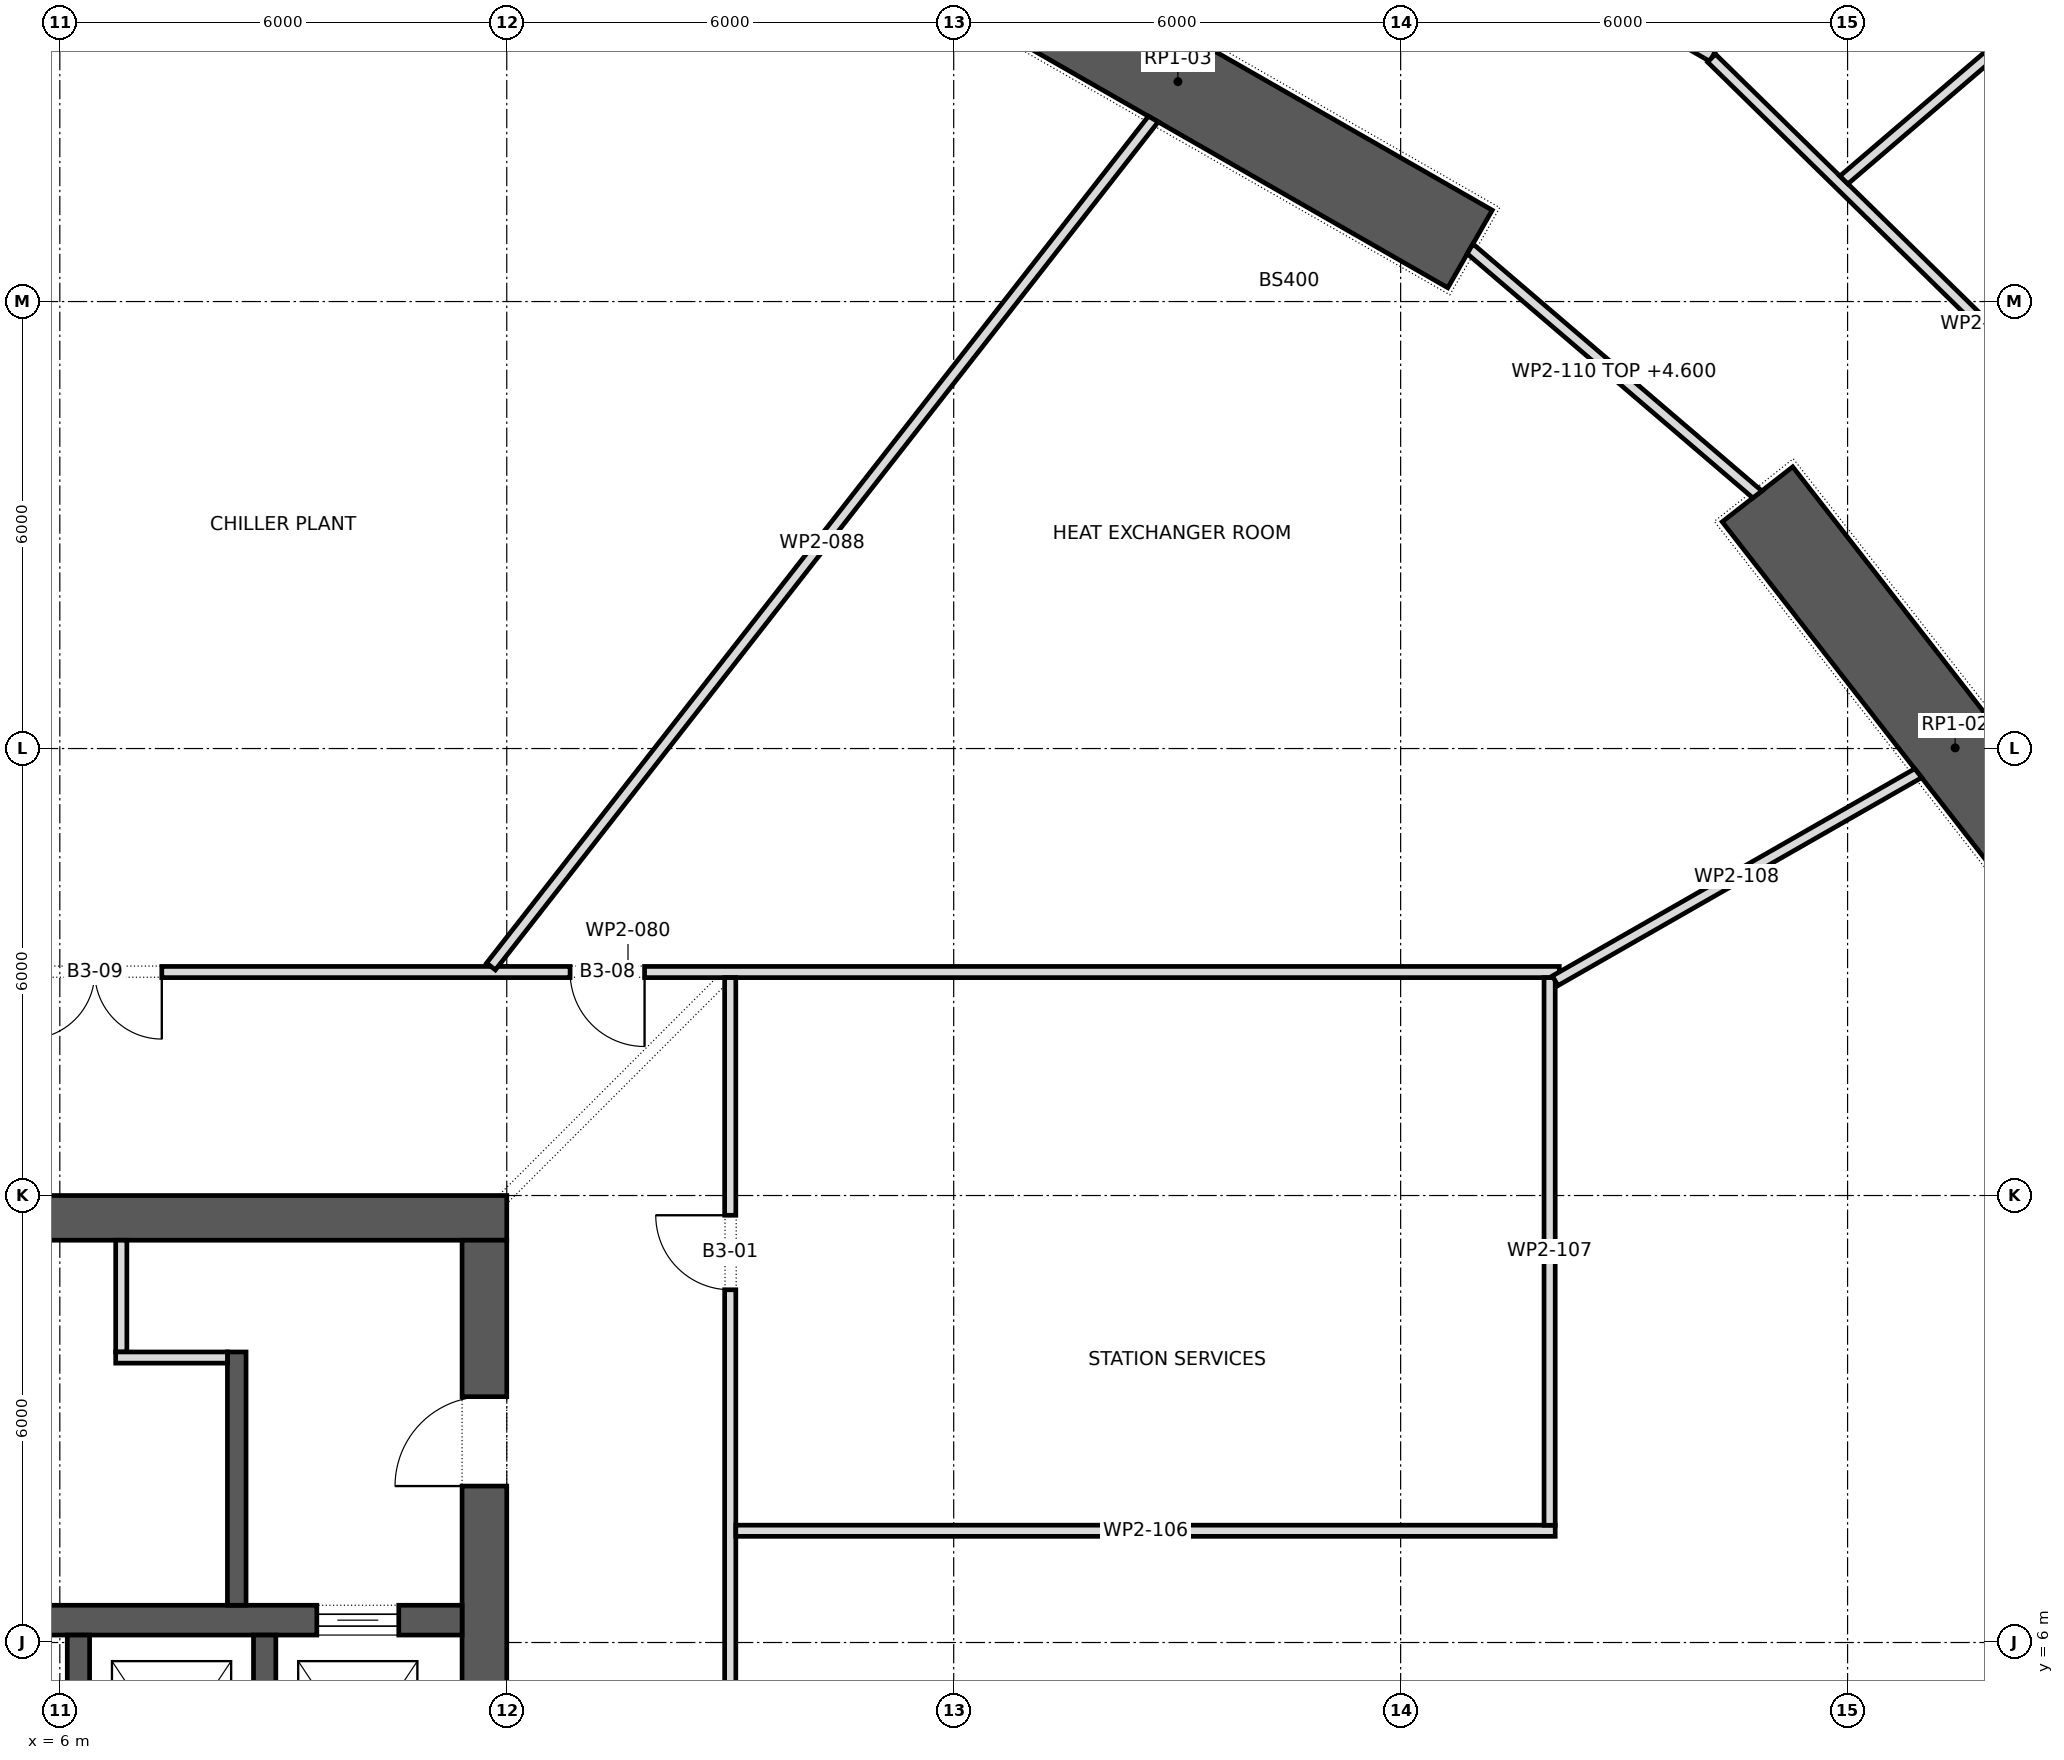
"""IFC4 building model, lengths in metres.
Left out: names, types, materials, properties, quantities, classifications, styles, units other than length and angle.
Written with IfcOpenShell. Run it as: python <this file> out.ifc"""

import sys

from ifc_helpers import new_model, si_unit, direction, frame, frame_2d, origin, place, context, subcontext, project, spatial, polyline, rectangle, outline, extrude, element, fill, save


model = new_model("IFC4")
c1 = context("Model", 3, precision=1e-05, world=origin(), true_north=direction((0.0, 1.0)))
c2 = subcontext(c1, "Body", "Model", "MODEL_VIEW")
j1 = project(units=[si_unit("LENGTHUNIT", "METRE"), si_unit("PLANEANGLEUNIT", "RADIAN")], contexts=[c1])
p1 = place(None, origin())
s1 = spatial("IfcSite", under=j1, at=p1, CompositionType="ELEMENT")
p2 = place(p1, origin())
s2 = spatial("IfcBuilding", under=s1, at=p2, CompositionType="ELEMENT")
p3 = place(p2, frame((0.0, 0.0, -15.0)))
s3 = spatial("IfcBuildingStorey", under=s2, at=p3, CompositionType="ELEMENT", Elevation=-15.0)
p4 = place(p3, frame((34.097, 14.605, -0.4), z_axis=(0.0, 0.0, 1.0), x_axis=(-0.614825322247, 0.788663314174, 0.0)))
e1 = element("IfcWall", 1, at=p4, inside=s3, PredefinedType="SHEAR", context=c2, shape_type="SweptSolid", body=[
    extrude(rectangle(XDim=8.632, YDim=1.2, at=frame_2d((4.316, 0.0))), origin(), (0.0, 0.0, 1.0), 5.9),
])
p5 = place(p3, frame((24.931, 24.706, -0.4), z_axis=(0.0, 0.0, 1.0), x_axis=(-0.867760656864, 0.496982336103, 0.0)))
e2 = element("IfcWall", 2, at=p5, inside=s3, PredefinedType="SHEAR", context=c2, shape_type="SweptSolid", body=[
    extrude(rectangle(XDim=9.038, YDim=1.2, at=frame_2d((4.519, 0.0))), origin(), (0.0, 0.0, 1.0), 5.9),
])
p6 = place(p3, frame((-12.0, 11.7, 0.0), z_axis=(0.0, 0.0, 1.0), x_axis=(1.0, 0.0, 0.0)))
e3 = element("IfcWall", 3, at=p6, inside=s3, PredefinedType="SHEAR", context=c2, shape_type="SweptSolid", body=[
    extrude(rectangle(XDim=24.0, YDim=0.6, at=frame_2d((12.0, 0.0))), origin(), (0.0, 0.0, 1.0), 5.5),
])
p7 = place(p6, frame((11.6, 0.0, 0.0)))
e4 = element("IfcOpeningElement", 4, at=p7, cuts=e3, PredefinedType="OPENING", context=c2, shape_type="SweptSolid", body=[
    extrude(rectangle(XDim=0.8, YDim=2.1, at=frame_2d((0.4, 1.05))), frame((0.0, 0.312, 0.0), z_axis=(0.0, -1.0, 0.0), x_axis=(1.0, 0.0, 0.0)), (0.0, 0.0, 1.0), 0.624),
])
p8 = place(p3, frame((11.7, -11.4, 0.0), z_axis=(0.0, 0.0, 1.0), x_axis=(0.0, 1.0, 0.0)))
e5 = element("IfcWall", 5, at=p8, inside=s3, PredefinedType="SHEAR", context=c2, shape_type="SweptSolid", body=[
    extrude(rectangle(XDim=22.8, YDim=0.6, at=frame_2d((11.4, 0.0))), origin(), (0.0, 0.0, 1.0), 5.5),
])
p9 = place(p8, frame((10.2, 0.0, 0.0)))
e6 = element("IfcOpeningElement", 6, at=p9, cuts=e5, PredefinedType="OPENING", context=c2, shape_type="SweptSolid", body=[
    extrude(rectangle(XDim=2.4, YDim=2.1, at=frame_2d((1.2, 1.05))), frame((0.0, 0.312, 0.0), z_axis=(0.0, -1.0, 0.0), x_axis=(1.0, 0.0, 0.0)), (0.0, 0.0, 1.0), 0.624),
])
p10 = place(p8, frame((19.5, 0.0, 0.0)))
e7 = element("IfcOpeningElement", 7, at=p10, cuts=e5, PredefinedType="OPENING", context=c2, shape_type="SweptSolid", body=[
    extrude(rectangle(XDim=1.2, YDim=2.1, at=frame_2d((0.6, 1.05))), frame((0.0, 0.312, 0.0), z_axis=(0.0, -1.0, 0.0), x_axis=(1.0, 0.0, 0.0)), (0.0, 0.0, 1.0), 0.624),
])
p11 = place(p8, frame((2.1, 0.0, 0.0)))
e8 = element("IfcOpeningElement", 8, at=p11, cuts=e5, PredefinedType="OPENING", context=c2, shape_type="SweptSolid", body=[
    extrude(rectangle(XDim=1.2, YDim=2.1, at=frame_2d((0.6, 1.05))), frame((0.0, 0.312, 0.0), z_axis=(0.0, -1.0, 0.0), x_axis=(1.0, 0.0, 0.0)), (0.0, 0.0, 1.0), 0.624),
])
p12 = place(p3, frame((-11.4, 6.3, 0.0), z_axis=(0.0, 0.0, 1.0), x_axis=(1.0, 0.0, 0.0)))
e9 = element("IfcWall", 9, at=p12, inside=s3, PredefinedType="SHEAR", context=c2, shape_type="SweptSolid", body=[
    extrude(rectangle(XDim=22.8, YDim=0.4, at=frame_2d((11.4, 0.0))), origin(), (0.0, 0.0, 1.0), 5.5),
])
p13 = place(p12, frame((20.85, 0.0, 0.0)))
e10 = element("IfcOpeningElement", 10, at=p13, cuts=e9, PredefinedType="OPENING", context=c2, shape_type="SweptSolid", body=[
    extrude(rectangle(XDim=1.1, YDim=2.1, at=frame_2d((0.55, 1.05))), frame((0.0, 0.212, 0.0), z_axis=(0.0, -1.0, 0.0), x_axis=(1.0, 0.0, 0.0)), (0.0, 0.0, 1.0), 0.424),
])
for number, where, z_axis, x_axis in (
    (11, (6.25, 3.2, 0.0), (0.0, 0.0, 1.0), (0.0, 1.0, 0.0)),
    (12, (8.75, 3.2, 0.0), (0.0, 0.0, 1.0), (0.0, 1.0, 0.0)),
):
    element("IfcWall", number, at=place(p3, frame(where, z_axis=z_axis, x_axis=x_axis)), inside=s3, PredefinedType="SHEAR", context=c2, shape_type="SweptSolid", body=[
        extrude(rectangle(XDim=2.9, YDim=0.3, at=frame_2d((1.45, 0.0))), origin(), (0.0, 0.0, 1.0), 5.5),
    ])
p14 = place(p3, frame((8.375, 6.5, 0.0), z_axis=(0.0, 0.0, 1.0), x_axis=(0.0, 1.0, 0.0)))
e13 = element("IfcWall", 13, at=p14, inside=s3, PredefinedType="SHEAR", context=c2, shape_type="SweptSolid", body=[
    extrude(rectangle(XDim=3.4, YDim=0.25, at=frame_2d((1.7, 0.0))), origin(), (0.0, 0.0, 1.0), 5.15),
])
for number, where, z_axis, x_axis in (
    (14, (6.825, 9.9, 0.0), (0.0, 0.0, 1.0), (0.0, 1.0, 0.0)),
    (15, (6.75, 9.825, 0.0), (0.0, 0.0, 1.0), (1.0, 0.0, 0.0)),
):
    element("IfcWall", number, at=place(p3, frame(where, z_axis=z_axis, x_axis=x_axis)), inside=s3, PredefinedType="PARTITIONING", context=c2, shape_type="SweptSolid", body=[
        extrude(rectangle(XDim=1.5, YDim=0.15, at=frame_2d((0.75, 0.0))), origin(), (0.0, 0.0, 1.0), 5.15),
    ])
p15 = place(p3, frame((1.125, 15.0, 0.0), z_axis=(0.0, 0.0, 1.0), x_axis=(1.0, 0.0, 0.0)))
e16 = element("IfcWall", 16, at=p15, inside=s3, PredefinedType="PARTITIONING", context=c2, shape_type="SweptSolid", body=[
    extrude(rectangle(XDim=25.005, YDim=0.15, at=frame_2d((12.502, 0.0))), origin(), (0.0, 0.0, 1.0), 5.15),
])
p16 = place(p15, frame((11.725, 0.0, 0.0)))
e17 = element("IfcOpeningElement", 17, at=p16, cuts=e16, PredefinedType="OPENING", context=c2, shape_type="SweptSolid", body=[
    extrude(rectangle(XDim=1.0, YDim=2.1, at=frame_2d((0.5, 1.05))), frame((0.0, 0.087, 0.0), z_axis=(0.0, -1.0, 0.0), x_axis=(1.0, 0.0, 0.0)), (0.0, 0.0, 1.0), 0.174),
])
p17 = place(p15, frame((4.444, 0.0, 0.0)))
e18 = element("IfcOpeningElement", 18, at=p17, cuts=e16, PredefinedType="OPENING", context=c2, shape_type="SweptSolid", body=[
    extrude(rectangle(XDim=1.8, YDim=2.1, at=frame_2d((0.9, 1.05))), frame((0.0, 0.087, 0.0), z_axis=(0.0, -1.0, 0.0), x_axis=(1.0, 0.0, 0.0)), (0.0, 0.0, 1.0), 0.174),
])
p18 = place(p3, frame((11.788, 15.074, 0.0), z_axis=(0.0, 0.0, 1.0), x_axis=(0.615848120598, 0.787864894735, 0.0)))
e19 = element("IfcWall", 19, at=p18, inside=s3, PredefinedType="PARTITIONING", context=c2, shape_type="SweptSolid", body=[
    extrude(outline(polyline([(0.0, -0.075), (14.449, -0.075), (14.428, 0.075), (0.0, 0.075), (0.0, -0.075)])), origin(), (0.0, 0.0, 1.0), 5.15),
])
p19 = place(p3, frame((15.0, -14.925, 0.0), z_axis=(0.0, 0.0, 1.0), x_axis=(0.0, 1.0, 0.0)))
e20 = element("IfcWall", 20, at=p19, inside=s3, PredefinedType="PARTITIONING", context=c2, shape_type="SweptSolid", body=[
    extrude(rectangle(XDim=29.85, YDim=0.15, at=frame_2d((14.925, 0.0))), origin(), (0.0, 0.0, 1.0), 5.15),
])
p20 = place(p19, frame((25.66, 0.0, 0.0)))
e21 = element("IfcOpeningElement", 21, at=p20, cuts=e20, PredefinedType="OPENING", context=c2, shape_type="SweptSolid", body=[
    extrude(rectangle(XDim=1.0, YDim=2.1, at=frame_2d((0.5, 1.05))), frame((0.0, 0.087, 0.0), z_axis=(0.0, -1.0, 0.0), x_axis=(1.0, 0.0, 0.0)), (0.0, 0.0, 1.0), 0.174),
])
p21 = place(p19, frame((3.19, 0.0, 0.0)))
e22 = element("IfcOpeningElement", 22, at=p21, cuts=e20, PredefinedType="OPENING", context=c2, shape_type="SweptSolid", body=[
    extrude(rectangle(XDim=1.0, YDim=2.1, at=frame_2d((0.5, 1.05))), frame((0.0, 0.087, 0.0), z_axis=(0.0, -1.0, 0.0), x_axis=(1.0, 0.0, 0.0)), (0.0, 0.0, 1.0), 0.174),
])
p22 = place(p19, frame((13.725, 0.0, 0.0)))
e23 = element("IfcOpeningElement", 23, at=p22, cuts=e20, PredefinedType="OPENING", context=c2, shape_type="SweptSolid", body=[
    extrude(rectangle(XDim=2.4, YDim=2.1, at=frame_2d((1.2, 1.05))), frame((0.0, 0.087, 0.0), z_axis=(0.0, -1.0, 0.0), x_axis=(1.0, 0.0, 0.0)), (0.0, 0.0, 1.0), 0.174),
])
p23 = place(p3, frame((18.948, 32.58, 0.0), z_axis=(0.0, 0.0, 1.0), x_axis=(0.867835024459, -0.496852463336, 0.0)))
e24 = element("IfcWall", 24, at=p23, inside=s3, PredefinedType="PARTITIONING", context=c2, shape_type="SweptSolid", body=[
    extrude(rectangle(XDim=10.647, YDim=0.15, at=frame_2d((5.323, 0.0))), origin(), (0.0, 0.0, 1.0), 5.15),
])
p24 = place(p23, frame((4.323, 0.0, 0.0)))
e25 = element("IfcOpeningElement", 25, at=p24, cuts=e24, PredefinedType="OPENING", context=c2, shape_type="SweptSolid", body=[
    extrude(rectangle(XDim=1.8, YDim=2.1, at=frame_2d((0.9, 1.05))), frame((0.0, 0.087, 0.0), z_axis=(0.0, -1.0, 0.0), x_axis=(1.0, 0.0, 0.0)), (0.0, 0.0, 1.0), 0.174),
])
p25 = place(p3, frame((26.075, 7.5, 0.0), z_axis=(0.0, 0.0, 1.0), x_axis=(-1.0, 0.0, 0.0)))
e26 = element("IfcWall", 26, at=p25, inside=s3, PredefinedType="PARTITIONING", context=c2, shape_type="SweptSolid", body=[
    extrude(rectangle(XDim=11.0, YDim=0.15, at=frame_2d((5.5, 0.0))), origin(), (0.0, 0.0, 1.0), 5.15),
])
p26 = place(p3, frame((26.0, 7.574, 0.0), z_axis=(0.0, 0.0, 1.0), x_axis=(0.0, 1.0, 0.0)))
e27 = element("IfcWall", 27, at=p26, inside=s3, PredefinedType="PARTITIONING", context=c2, shape_type="SweptSolid", body=[
    extrude(rectangle(XDim=7.351, YDim=0.15, at=frame_2d((3.676, 0.0))), origin(), (0.0, 0.0, 1.0), 5.15),
])
p27 = place(p3, frame((26.074, 14.882, 0.0), z_axis=(0.0, 0.0, 1.0), x_axis=(0.868133416031, 0.496330909746, 0.0)))
e28 = element("IfcWall", 28, at=p27, inside=s3, PredefinedType="PARTITIONING", context=c2, shape_type="SweptSolid", body=[
    extrude(outline(polyline([(0.0, -0.075), (5.626, -0.075), (5.604, 0.075), (0.0, 0.075), (0.0, -0.075)])), origin(), (0.0, 0.0, 1.0), 5.15),
])
p28 = place(p3, frame((28.174, 27.268, 0.0), z_axis=(0.0, 0.0, 1.0), x_axis=(0.714427427428, -0.699709547554, 0.0)))
e29 = element("IfcWall", 29, at=p28, inside=s3, PredefinedType="PARTITIONING", context=c2, shape_type="SweptSolid", body=[
    extrude(rectangle(XDim=10.202, YDim=0.15, at=frame_2d((5.101, 0.0))), origin(), (0.0, 0.0, 1.0), 5.15),
])
p29 = place(p28, frame((5.74, 0.0, 0.0)))
e30 = element("IfcOpeningElement", 30, at=p29, cuts=e29, PredefinedType="OPENING", context=c2, shape_type="SweptSolid", body=[
    extrude(rectangle(XDim=1.0, YDim=2.1, at=frame_2d((0.5, 1.05))), frame((0.0, 0.087, 0.0), z_axis=(0.0, -1.0, 0.0), x_axis=(1.0, 0.0, 0.0)), (0.0, 0.0, 1.0), 0.174),
])
p30 = place(p3, frame((28.789, 21.411, 0.0), z_axis=(0.0, 0.0, 1.0), x_axis=(-0.760084552743, 0.649824185978, 0.0)))
e31 = element("IfcWall", 31, at=p30, inside=s3, PredefinedType="PARTITIONING", context=c2, shape_type="SweptSolid", body=[
    extrude(outline(polyline([(-0.015, -0.075), (5.089, -0.075), (5.061, 0.075), (0.015, 0.075), (-0.015, -0.075)])), origin(), (0.0, 0.0, 1.0), 4.6),
])
p31 = place(p3, frame((29.95, 25.632, 0.0), z_axis=(0.0, 0.0, 1.0), x_axis=(0.759739094859, 0.650228042876, 0.0)))
e32 = element("IfcWall", 32, at=p31, inside=s3, PredefinedType="PARTITIONING", context=c2, shape_type="SweptSolid", body=[
    extrude(outline(polyline([(0.007, -0.075), (9.901, -0.075), (9.878, 0.075), (-0.007, 0.075), (0.007, -0.075)])), origin(), (0.0, 0.0, 1.0), 5.15),
])
p32 = place(p13, origin())
e33 = element("IfcDoor", 33, at=p32, inside=s3, OperationType="SLIDING_TO_LEFT", PredefinedType="DOOR", context=c2, shape_type="SweptSolid", body=[
    extrude(rectangle(XDim=1.1, YDim=2.1, at=frame_2d((0.55, 1.05))), frame((0.0, 0.025, 0.0), z_axis=(0.0, -1.0, 0.0), x_axis=(1.0, 0.0, 0.0)), (0.0, 0.0, 1.0), 0.05),
])
fill(e10, e33)
p33 = place(p10, origin())
e34 = element("IfcDoor", 34, at=p33, inside=s3, OperationType="SINGLE_SWING_RIGHT", PredefinedType="DOOR", context=c2, shape_type="SweptSolid", body=[
    extrude(rectangle(XDim=1.2, YDim=2.1, at=frame_2d((0.6, 1.05))), frame((0.0, 0.025, 0.0), z_axis=(0.0, -1.0, 0.0), x_axis=(1.0, 0.0, 0.0)), (0.0, 0.0, 1.0), 0.05),
])
fill(e7, e34)
p34 = place(p20, origin())
e35 = element("IfcDoor", 35, at=p34, inside=s3, OperationType="SINGLE_SWING_LEFT", PredefinedType="DOOR", context=c2, shape_type="SweptSolid", body=[
    extrude(rectangle(XDim=1.0, YDim=2.1, at=frame_2d((0.5, 1.05))), frame((0.0, 0.025, 0.0), z_axis=(0.0, -1.0, 0.0), x_axis=(1.0, 0.0, 0.0)), (0.0, 0.0, 1.0), 0.05),
])
fill(e21, e35)
p35 = place(p16, frame((1.0, 0.0, 0.0), z_axis=(0.0, 0.0, 1.0), x_axis=(-1.0, 0.0, 0.0)))
e36 = element("IfcDoor", 36, at=p35, inside=s3, OperationType="SINGLE_SWING_RIGHT", PredefinedType="DOOR", context=c2, shape_type="SweptSolid", body=[
    extrude(rectangle(XDim=1.0, YDim=2.1, at=frame_2d((0.5, 1.05))), frame((0.0, 0.025, 0.0), z_axis=(0.0, -1.0, 0.0), x_axis=(1.0, 0.0, 0.0)), (0.0, 0.0, 1.0), 0.05),
])
fill(e17, e36)
p36 = place(p17, frame((1.8, 0.0, 0.0), z_axis=(0.0, 0.0, 1.0), x_axis=(-1.0, 0.0, 0.0)))
e37 = element("IfcDoor", 37, at=p36, inside=s3, OperationType="DOUBLE_DOOR_SINGLE_SWING", PredefinedType="DOOR", context=c2, shape_type="SweptSolid", body=[
    extrude(rectangle(XDim=1.8, YDim=2.1, at=frame_2d((0.9, 1.05))), frame((0.0, 0.025, 0.0), z_axis=(0.0, -1.0, 0.0), x_axis=(1.0, 0.0, 0.0)), (0.0, 0.0, 1.0), 0.05),
])
fill(e18, e37)
save(model, sys.argv[1])
